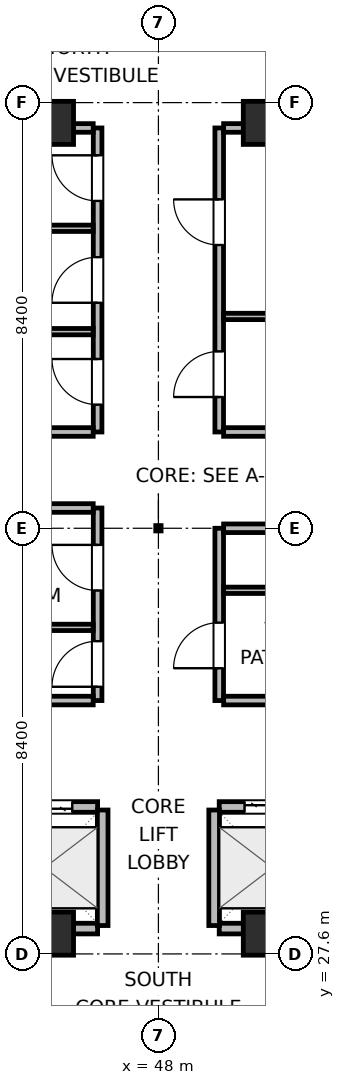
"""IFC4 building model, lengths in metres.
Left out: names, types, materials, properties, quantities, classifications, styles, units other than length and angle.
Written with IfcOpenShell. Run it as: python <this file> out.ifc"""

import sys

from ifc_helpers import new_model, si_unit, direction, frame, frame_2d, origin, origin_2d, place, context, subcontext, project, spatial, rectangle, extrude, element, fill, save


model = new_model("IFC4")
c1 = context("Model", 3, precision=1e-05, world=origin(), true_north=direction((0.0, 1.0)))
c2 = subcontext(c1, "Body", "Model", "MODEL_VIEW")
j1 = project(units=[si_unit("LENGTHUNIT", "METRE"), si_unit("PLANEANGLEUNIT", "RADIAN")], contexts=[c1])
p1 = place(None, origin())
s1 = spatial("IfcSite", under=j1, at=p1, CompositionType="ELEMENT")
p2 = place(p1, origin())
s2 = spatial("IfcBuilding", under=s1, at=p2, CompositionType="ELEMENT")
p3 = place(p2, frame((0.0, 0.0, 101.4)))
s3 = spatial("IfcBuildingStorey", under=s2, at=p3, CompositionType="ELEMENT", Elevation=101.4)
for number, where, z_axis, x_axis in (
    (1, (45.9, 28.0, 0.0), (0.0, 0.0, 1.0), (1.0, 0.0, 0.0)),
    (2, (50.1, 28.0, 0.0), (0.0, 0.0, 1.0), (1.0, 0.0, 0.0)),
    (3, (45.9, 44.0, 0.0), (0.0, 0.0, 1.0), (1.0, 0.0, 0.0)),
    (4, (50.1, 44.0, 0.0), (0.0, 0.0, 1.0), (1.0, 0.0, 0.0)),
):
    element("IfcColumn", number, at=place(p3, frame(where, z_axis=z_axis, x_axis=x_axis)), inside=s3, PredefinedType="COLUMN", context=c2, shape_type="SweptSolid", body=[
        extrude(rectangle(XDim=0.85, YDim=0.85, at=origin_2d()), origin(), (0.0, 0.0, 1.0), 3.9),
    ])
p4 = place(p3, frame((44.7, 30.5, 0.0), z_axis=(0.0, 0.0, 1.0), x_axis=(1.0, 0.0, 0.0)))
e5 = element("IfcWall", 5, at=p4, inside=s3, PredefinedType="PARTITIONING", context=c2, shape_type="SweptSolid", body=[
    extrude(rectangle(XDim=2.1, YDim=0.21, at=frame_2d((1.05, 0.0))), origin(), (0.0, 0.0, 1.0), 3.64),
])
p5 = place(p4, frame((0.5, 0.0, 0.0)))
e6 = element("IfcOpeningElement", 6, at=p5, cuts=e5, PredefinedType="OPENING", context=c2, shape_type="SweptSolid", body=[
    extrude(rectangle(XDim=1.1, YDim=2.04, at=frame_2d((0.55, 1.02))), frame((0.0, 0.115, 0.0), z_axis=(0.0, -1.0, 0.0), x_axis=(1.0, 0.0, 0.0)), (0.0, 0.0, 1.0), 0.23),
])
p6 = place(p3, frame((44.7, 28.1, 0.0), z_axis=(0.0, 0.0, 1.0), x_axis=(1.0, 0.0, 0.0)))
e7 = element("IfcWall", 7, at=p6, inside=s3, PredefinedType="PARTITIONING", context=c2, shape_type="SweptSolid", body=[
    extrude(rectangle(XDim=2.1, YDim=0.21, at=frame_2d((1.05, 0.0))), origin(), (0.0, 0.0, 1.0), 2.525),
])
p7 = place(p3, frame((46.9, 28.16, 0.0), z_axis=(0.0, 0.0, 1.0), x_axis=(0.0, 1.0, 0.0)))
e8 = element("IfcWall", 8, at=p7, inside=s3, PredefinedType="PARTITIONING", context=c2, shape_type="SweptSolid", body=[
    extrude(rectangle(XDim=2.28, YDim=0.21, at=frame_2d((1.14, 0.0))), origin(), (0.0, 0.0, 1.0), 3.64),
])
p8 = place(p3, frame((49.2, 30.5, 0.0), z_axis=(0.0, 0.0, 1.0), x_axis=(1.0, 0.0, 0.0)))
e9 = element("IfcWall", 9, at=p8, inside=s3, PredefinedType="PARTITIONING", context=c2, shape_type="SweptSolid", body=[
    extrude(rectangle(XDim=2.1, YDim=0.21, at=frame_2d((1.05, 0.0))), origin(), (0.0, 0.0, 1.0), 3.64),
])
p9 = place(p8, frame((0.5, 0.0, 0.0)))
e10 = element("IfcOpeningElement", 10, at=p9, cuts=e9, PredefinedType="OPENING", context=c2, shape_type="SweptSolid", body=[
    extrude(rectangle(XDim=1.1, YDim=2.04, at=frame_2d((0.55, 1.02))), frame((0.0, 0.115, 0.0), z_axis=(0.0, -1.0, 0.0), x_axis=(1.0, 0.0, 0.0)), (0.0, 0.0, 1.0), 0.23),
])
p10 = place(p3, frame((49.2, 28.1, 0.0), z_axis=(0.0, 0.0, 1.0), x_axis=(1.0, 0.0, 0.0)))
e11 = element("IfcWall", 11, at=p10, inside=s3, PredefinedType="PARTITIONING", context=c2, shape_type="SweptSolid", body=[
    extrude(rectangle(XDim=2.1, YDim=0.21, at=frame_2d((1.05, 0.0))), origin(), (0.0, 0.0, 1.0), 2.525),
])
p11 = place(p3, frame((49.1, 28.16, 0.0), z_axis=(0.0, 0.0, 1.0), x_axis=(0.0, 1.0, 0.0)))
e12 = element("IfcWall", 12, at=p11, inside=s3, PredefinedType="PARTITIONING", context=c2, shape_type="SweptSolid", body=[
    extrude(rectangle(XDim=2.28, YDim=0.21, at=frame_2d((1.14, 0.0))), origin(), (0.0, 0.0, 1.0), 3.64),
])
p12 = place(p3, frame((46.8, 32.6, 0.0), z_axis=(0.0, 0.0, 1.0), x_axis=(0.0, 1.0, 0.0)))
e13 = element("IfcWall", 13, at=p12, inside=s3, PredefinedType="PARTITIONING", context=c2, shape_type="SweptSolid", body=[
    extrude(rectangle(XDim=3.8, YDim=0.17, at=frame_2d((1.9, 0.0))), origin(), (0.0, 0.0, 1.0), 3.64),
])
p13 = place(p12, frame((0.272, 0.0, 0.0)))
e14 = element("IfcOpeningElement", 14, at=p13, cuts=e13, PredefinedType="OPENING", context=c2, shape_type="SweptSolid", body=[
    extrude(rectangle(XDim=0.9, YDim=2.02, at=frame_2d((0.45, 1.01))), frame((0.0, 0.095, 0.0), z_axis=(0.0, -1.0, 0.0), x_axis=(1.0, 0.0, 0.0)), (0.0, 0.0, 1.0), 0.19),
])
p14 = place(p12, frame((2.172, 0.0, 0.0)))
e15 = element("IfcOpeningElement", 15, at=p14, cuts=e13, PredefinedType="OPENING", context=c2, shape_type="SweptSolid", body=[
    extrude(rectangle(XDim=0.9, YDim=2.02, at=frame_2d((0.45, 1.01))), frame((0.0, 0.095, 0.0), z_axis=(0.0, -1.0, 0.0), x_axis=(1.0, 0.0, 0.0)), (0.0, 0.0, 1.0), 0.19),
])
for number, where, z_axis, x_axis in (
    (16, (43.8, 32.6, 0.0), (0.0, 0.0, 1.0), (1.0, 0.0, 0.0)),
    (17, (43.8, 36.4, 0.0), (0.0, 0.0, 1.0), (1.0, 0.0, 0.0)),
):
    element("IfcWall", number, at=place(p3, frame(where, z_axis=z_axis, x_axis=x_axis)), inside=s3, PredefinedType="PARTITIONING", context=c2, shape_type="SweptSolid", body=[
        extrude(rectangle(XDim=2.913, YDim=0.17, at=frame_2d((1.457, 0.0))), origin(), (0.0, 0.0, 1.0), 3.64),
    ])
p15 = place(p3, frame((43.8, 34.044, 0.0), z_axis=(0.0, 0.0, 1.0), x_axis=(1.0, 0.0, 0.0)))
e18 = element("IfcWall", 18, at=p15, inside=s3, PredefinedType="PARTITIONING", context=c2, shape_type="SweptSolid", body=[
    extrude(rectangle(XDim=2.913, YDim=0.125, at=frame_2d((1.457, 0.0))), origin(), (0.0, 0.0, 1.0), 3.64),
])
p16 = place(p3, frame((49.2, 32.6, 0.0), z_axis=(0.0, 0.0, 1.0), x_axis=(0.0, 1.0, 0.0)))
e19 = element("IfcWall", 19, at=p16, inside=s3, PredefinedType="PARTITIONING", context=c2, shape_type="SweptSolid", body=[
    extrude(rectangle(XDim=3.4, YDim=0.17, at=frame_2d((1.7, 0.0))), origin(), (0.0, 0.0, 1.0), 3.64),
])
p17 = place(p16, frame((0.638, 0.0, 0.0)))
e20 = element("IfcOpeningElement", 20, at=p17, cuts=e19, PredefinedType="OPENING", context=c2, shape_type="SweptSolid", body=[
    extrude(rectangle(XDim=0.9, YDim=2.02, at=frame_2d((0.45, 1.01))), frame((0.0, 0.095, 0.0), z_axis=(0.0, -1.0, 0.0), x_axis=(1.0, 0.0, 0.0)), (0.0, 0.0, 1.0), 0.19),
])
for number, where, z_axis, x_axis in (
    (21, (49.287, 32.6, 0.0), (0.0, 0.0, 1.0), (1.0, 0.0, 0.0)),
    (22, (49.287, 36.0, 0.0), (0.0, 0.0, 1.0), (1.0, 0.0, 0.0)),
):
    element("IfcWall", number, at=place(p3, frame(where, z_axis=z_axis, x_axis=x_axis)), inside=s3, PredefinedType="PARTITIONING", context=c2, shape_type="SweptSolid", body=[
        extrude(rectangle(XDim=2.913, YDim=0.17, at=frame_2d((1.457, 0.0))), origin(), (0.0, 0.0, 1.0), 3.64),
    ])
p18 = place(p3, frame((49.287, 34.776, 0.0), z_axis=(0.0, 0.0, 1.0), x_axis=(1.0, 0.0, 0.0)))
e23 = element("IfcWall", 23, at=p18, inside=s3, PredefinedType="PARTITIONING", context=c2, shape_type="SweptSolid", body=[
    extrude(rectangle(XDim=2.913, YDim=0.125, at=frame_2d((1.457, 0.0))), origin(), (0.0, 0.0, 1.0), 3.64),
])
p19 = place(p3, frame((46.8, 37.9, 0.0), z_axis=(0.0, 0.0, 1.0), x_axis=(0.0, 1.0, 0.0)))
e24 = element("IfcWall", 24, at=p19, inside=s3, PredefinedType="PARTITIONING", context=c2, shape_type="SweptSolid", body=[
    extrude(rectangle(XDim=6.0, YDim=0.17, at=frame_2d((3.0, 0.0))), origin(), (0.0, 0.0, 1.0), 3.64),
])
p20 = place(p19, frame((0.54, 0.0, 0.0)))
e25 = element("IfcOpeningElement", 25, at=p20, cuts=e24, PredefinedType="OPENING", context=c2, shape_type="SweptSolid", body=[
    extrude(rectangle(XDim=0.9, YDim=2.02, at=frame_2d((0.45, 1.01))), frame((0.0, 0.095, 0.0), z_axis=(0.0, -1.0, 0.0), x_axis=(1.0, 0.0, 0.0)), (0.0, 0.0, 1.0), 0.19),
])
p21 = place(p19, frame((2.55, 0.0, 0.0)))
e26 = element("IfcOpeningElement", 26, at=p21, cuts=e24, PredefinedType="OPENING", context=c2, shape_type="SweptSolid", body=[
    extrude(rectangle(XDim=0.9, YDim=2.02, at=frame_2d((0.45, 1.01))), frame((0.0, 0.095, 0.0), z_axis=(0.0, -1.0, 0.0), x_axis=(1.0, 0.0, 0.0)), (0.0, 0.0, 1.0), 0.19),
])
p22 = place(p19, frame((4.56, 0.0, 0.0)))
e27 = element("IfcOpeningElement", 27, at=p22, cuts=e24, PredefinedType="OPENING", context=c2, shape_type="SweptSolid", body=[
    extrude(rectangle(XDim=0.9, YDim=2.02, at=frame_2d((0.45, 1.01))), frame((0.0, 0.095, 0.0), z_axis=(0.0, -1.0, 0.0), x_axis=(1.0, 0.0, 0.0)), (0.0, 0.0, 1.0), 0.19),
])
p23 = place(p3, frame((42.5, 37.9, 0.0), z_axis=(0.0, 0.0, 1.0), x_axis=(1.0, 0.0, 0.0)))
e28 = element("IfcWall", 28, at=p23, inside=s3, PredefinedType="PARTITIONING", context=c2, shape_type="SweptSolid", body=[
    extrude(rectangle(XDim=4.213, YDim=0.17, at=frame_2d((2.106, 0.0))), origin(), (0.0, 0.0, 1.0), 3.64),
])
p24 = place(p3, frame((42.5, 43.9, 0.0), z_axis=(0.0, 0.0, 1.0), x_axis=(1.0, 0.0, 0.0)))
e29 = element("IfcWall", 29, at=p24, inside=s3, PredefinedType="PARTITIONING", context=c2, shape_type="SweptSolid", body=[
    extrude(rectangle(XDim=4.213, YDim=0.17, at=frame_2d((2.106, 0.0))), origin(), (0.0, 0.0, 1.0), 2.525),
])
for number, where, z_axis, x_axis in (
    (30, (42.5, 39.88, 0.0), (0.0, 0.0, 1.0), (1.0, 0.0, 0.0)),
    (31, (42.5, 41.92, 0.0), (0.0, 0.0, 1.0), (1.0, 0.0, 0.0)),
):
    element("IfcWall", number, at=place(p3, frame(where, z_axis=z_axis, x_axis=x_axis)), inside=s3, PredefinedType="PARTITIONING", context=c2, shape_type="SweptSolid", body=[
        extrude(rectangle(XDim=4.213, YDim=0.125, at=frame_2d((2.106, 0.0))), origin(), (0.0, 0.0, 1.0), 3.64),
    ])
p25 = place(p3, frame((49.2, 37.9, 0.0), z_axis=(0.0, 0.0, 1.0), x_axis=(0.0, 1.0, 0.0)))
e32 = element("IfcWall", 32, at=p25, inside=s3, PredefinedType="PARTITIONING", context=c2, shape_type="SweptSolid", body=[
    extrude(rectangle(XDim=6.0, YDim=0.17, at=frame_2d((3.0, 0.0))), origin(), (0.0, 0.0, 1.0), 3.64),
])
p26 = place(p25, frame((0.69, 0.0, 0.0)))
e33 = element("IfcOpeningElement", 33, at=p26, cuts=e32, PredefinedType="OPENING", context=c2, shape_type="SweptSolid", body=[
    extrude(rectangle(XDim=0.9, YDim=2.02, at=frame_2d((0.45, 1.01))), frame((0.0, 0.095, 0.0), z_axis=(0.0, -1.0, 0.0), x_axis=(1.0, 0.0, 0.0)), (0.0, 0.0, 1.0), 0.19),
])
p27 = place(p25, frame((3.69, 0.0, 0.0)))
e34 = element("IfcOpeningElement", 34, at=p27, cuts=e32, PredefinedType="OPENING", context=c2, shape_type="SweptSolid", body=[
    extrude(rectangle(XDim=0.9, YDim=2.02, at=frame_2d((0.45, 1.01))), frame((0.0, 0.095, 0.0), z_axis=(0.0, -1.0, 0.0), x_axis=(1.0, 0.0, 0.0)), (0.0, 0.0, 1.0), 0.19),
])
p28 = place(p3, frame((49.287, 37.9, 0.0), z_axis=(0.0, 0.0, 1.0), x_axis=(1.0, 0.0, 0.0)))
e35 = element("IfcWall", 35, at=p28, inside=s3, PredefinedType="PARTITIONING", context=c2, shape_type="SweptSolid", body=[
    extrude(rectangle(XDim=4.113, YDim=0.17, at=frame_2d((2.056, 0.0))), origin(), (0.0, 0.0, 1.0), 3.64),
])
p29 = place(p3, frame((49.287, 43.9, 0.0), z_axis=(0.0, 0.0, 1.0), x_axis=(1.0, 0.0, 0.0)))
e36 = element("IfcWall", 36, at=p29, inside=s3, PredefinedType="PARTITIONING", context=c2, shape_type="SweptSolid", body=[
    extrude(rectangle(XDim=4.113, YDim=0.17, at=frame_2d((2.056, 0.0))), origin(), (0.0, 0.0, 1.0), 2.525),
])
p30 = place(p3, frame((49.287, 40.18, 0.0), z_axis=(0.0, 0.0, 1.0), x_axis=(1.0, 0.0, 0.0)))
e37 = element("IfcWall", 37, at=p30, inside=s3, PredefinedType="PARTITIONING", context=c2, shape_type="SweptSolid", body=[
    extrude(rectangle(XDim=4.113, YDim=0.125, at=frame_2d((2.056, 0.0))), origin(), (0.0, 0.0, 1.0), 3.64),
])
p31 = place(p5, origin())
e38 = element("IfcDoor", 38, at=p31, inside=s3, OperationType="DOUBLE_DOOR_SLIDING", PredefinedType="DOOR", context=c2, shape_type="SweptSolid", body=[
    extrude(rectangle(XDim=1.1, YDim=2.04, at=frame_2d((0.55, 1.02))), frame((0.0, 0.025, 0.0), z_axis=(0.0, -1.0, 0.0), x_axis=(1.0, 0.0, 0.0)), (0.0, 0.0, 1.0), 0.05),
])
fill(e6, e38)
p32 = place(p9, origin())
e39 = element("IfcDoor", 39, at=p32, inside=s3, OperationType="DOUBLE_DOOR_SLIDING", PredefinedType="DOOR", context=c2, shape_type="SweptSolid", body=[
    extrude(rectangle(XDim=1.1, YDim=2.04, at=frame_2d((0.55, 1.02))), frame((0.0, 0.025, 0.0), z_axis=(0.0, -1.0, 0.0), x_axis=(1.0, 0.0, 0.0)), (0.0, 0.0, 1.0), 0.05),
])
fill(e10, e39)
p33 = place(p13, origin())
e40 = element("IfcDoor", 40, at=p33, inside=s3, OperationType="SINGLE_SWING_LEFT", PredefinedType="DOOR", context=c2, shape_type="SweptSolid", body=[
    extrude(rectangle(XDim=0.9, YDim=2.02, at=frame_2d((0.45, 1.01))), frame((0.0, 0.025, 0.0), z_axis=(0.0, -1.0, 0.0), x_axis=(1.0, 0.0, 0.0)), (0.0, 0.0, 1.0), 0.05),
])
fill(e14, e40)
p34 = place(p14, origin())
e41 = element("IfcDoor", 41, at=p34, inside=s3, OperationType="SINGLE_SWING_RIGHT", PredefinedType="DOOR", context=c2, shape_type="SweptSolid", body=[
    extrude(rectangle(XDim=0.9, YDim=2.02, at=frame_2d((0.45, 1.01))), frame((0.0, 0.025, 0.0), z_axis=(0.0, -1.0, 0.0), x_axis=(1.0, 0.0, 0.0)), (0.0, 0.0, 1.0), 0.05),
])
fill(e15, e41)
p35 = place(p17, origin())
e42 = element("IfcDoor", 42, at=p35, inside=s3, OperationType="SINGLE_SWING_LEFT", PredefinedType="DOOR", context=c2, shape_type="SweptSolid", body=[
    extrude(rectangle(XDim=0.9, YDim=2.02, at=frame_2d((0.45, 1.01))), frame((0.0, 0.025, 0.0), z_axis=(0.0, -1.0, 0.0), x_axis=(1.0, 0.0, 0.0)), (0.0, 0.0, 1.0), 0.05),
])
fill(e20, e42)
p36 = place(p20, origin())
e43 = element("IfcDoor", 43, at=p36, inside=s3, OperationType="SINGLE_SWING_RIGHT", PredefinedType="DOOR", context=c2, shape_type="SweptSolid", body=[
    extrude(rectangle(XDim=0.9, YDim=2.02, at=frame_2d((0.45, 1.01))), frame((0.0, 0.025, 0.0), z_axis=(0.0, -1.0, 0.0), x_axis=(1.0, 0.0, 0.0)), (0.0, 0.0, 1.0), 0.05),
])
fill(e25, e43)
p37 = place(p21, origin())
e44 = element("IfcDoor", 44, at=p37, inside=s3, OperationType="SINGLE_SWING_LEFT", PredefinedType="DOOR", context=c2, shape_type="SweptSolid", body=[
    extrude(rectangle(XDim=0.9, YDim=2.02, at=frame_2d((0.45, 1.01))), frame((0.0, 0.025, 0.0), z_axis=(0.0, -1.0, 0.0), x_axis=(1.0, 0.0, 0.0)), (0.0, 0.0, 1.0), 0.05),
])
fill(e26, e44)
p38 = place(p22, origin())
e45 = element("IfcDoor", 45, at=p38, inside=s3, OperationType="SINGLE_SWING_RIGHT", PredefinedType="DOOR", context=c2, shape_type="SweptSolid", body=[
    extrude(rectangle(XDim=0.9, YDim=2.02, at=frame_2d((0.45, 1.01))), frame((0.0, 0.025, 0.0), z_axis=(0.0, -1.0, 0.0), x_axis=(1.0, 0.0, 0.0)), (0.0, 0.0, 1.0), 0.05),
])
fill(e27, e45)
p39 = place(p26, origin())
e46 = element("IfcDoor", 46, at=p39, inside=s3, OperationType="SINGLE_SWING_LEFT", PredefinedType="DOOR", context=c2, shape_type="SweptSolid", body=[
    extrude(rectangle(XDim=0.9, YDim=2.02, at=frame_2d((0.45, 1.01))), frame((0.0, 0.025, 0.0), z_axis=(0.0, -1.0, 0.0), x_axis=(1.0, 0.0, 0.0)), (0.0, 0.0, 1.0), 0.05),
])
fill(e33, e46)
p40 = place(p27, origin())
e47 = element("IfcDoor", 47, at=p40, inside=s3, OperationType="SINGLE_SWING_RIGHT", PredefinedType="DOOR", context=c2, shape_type="SweptSolid", body=[
    extrude(rectangle(XDim=0.9, YDim=2.02, at=frame_2d((0.45, 1.01))), frame((0.0, 0.025, 0.0), z_axis=(0.0, -1.0, 0.0), x_axis=(1.0, 0.0, 0.0)), (0.0, 0.0, 1.0), 0.05),
])
fill(e34, e47)
save(model, sys.argv[1])
